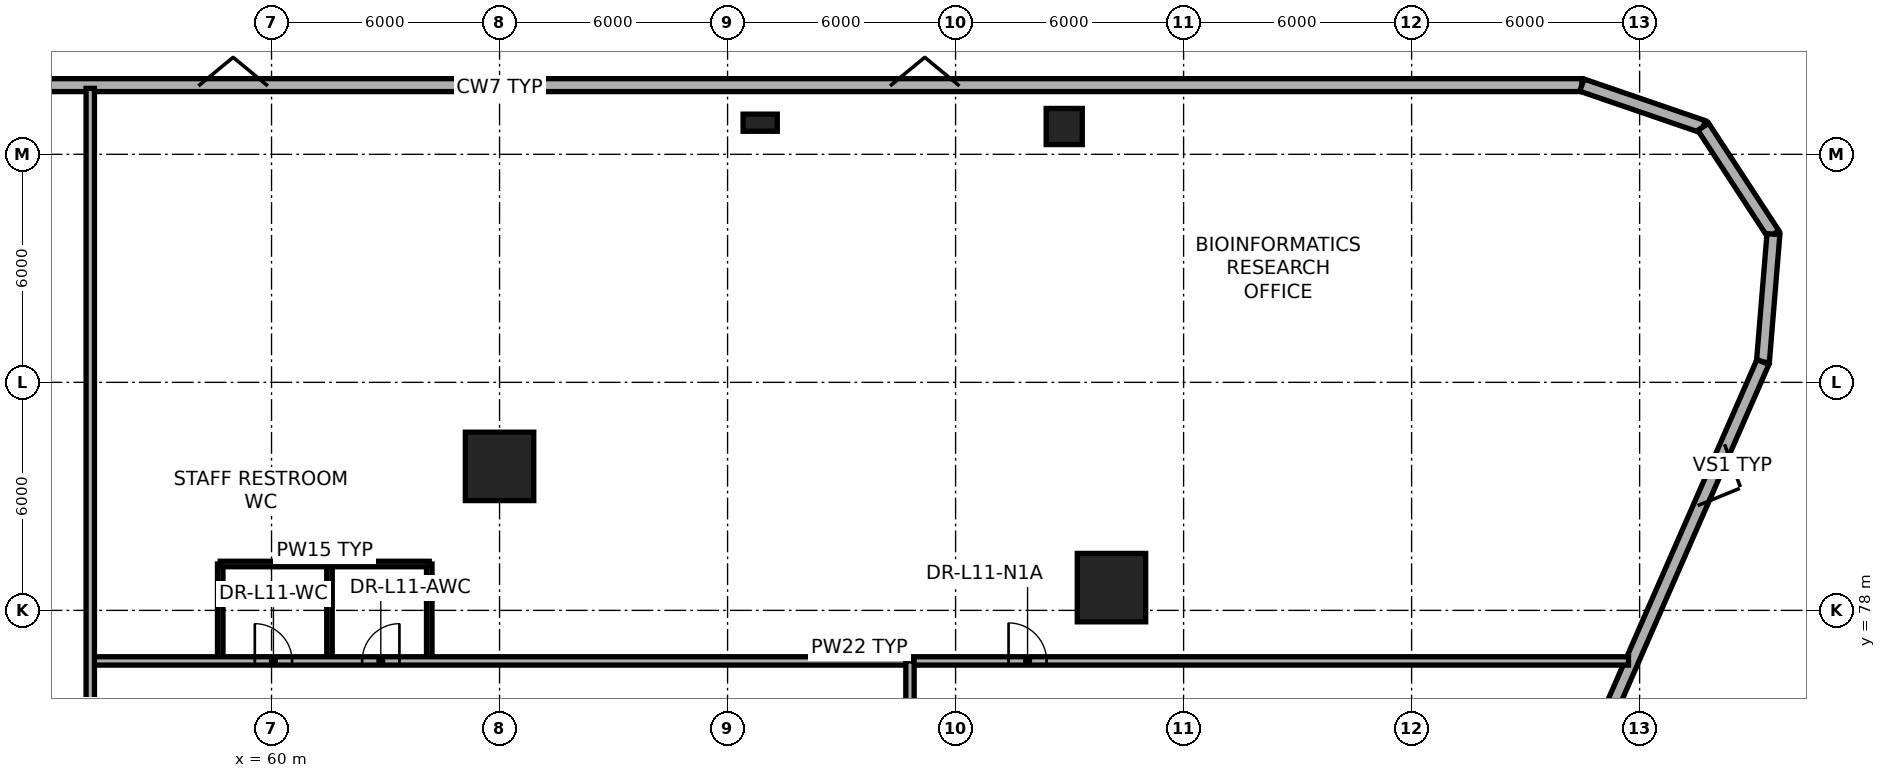
"""IFC4 building model, lengths in metres.
Left out: names, types, materials, properties, quantities, classifications, styles, units other than length and angle.
Written with IfcOpenShell. Run it as: python <this file> out.ifc"""

import sys

from ifc_helpers import new_model, si_unit, direction, frame, frame_2d, origin, origin_2d, place, context, subcontext, project, spatial, rectangle, extrude, element, fill, save


model = new_model("IFC4")
c1 = context("Model", 3, precision=1e-05, world=origin(), true_north=direction((0.0, 1.0)))
c2 = subcontext(c1, "Body", "Model", "MODEL_VIEW")
j1 = project(units=[si_unit("LENGTHUNIT", "METRE"), si_unit("PLANEANGLEUNIT", "RADIAN")], contexts=[c1])
p1 = place(None, origin())
s1 = spatial("IfcSite", under=j1, at=p1, CompositionType="ELEMENT")
p2 = place(p1, origin())
s2 = spatial("IfcBuilding", under=s1, at=p2, CompositionType="ELEMENT")
p3 = place(p2, frame((0.0, 0.0, 44.7)))
s3 = spatial("IfcBuildingStorey", under=s2, at=p3, CompositionType="ELEMENT", Elevation=44.7)
for number, where, z_axis, x_axis in (
    (1, (82.102, 78.599, 0.0), (0.0, 0.0, 1.0), (1.0, 0.0, 0.0)),
    (2, (66.0, 81.789, 0.0), (0.0, 0.0, 1.0), (1.0, 0.0, 0.0)),
):
    element("IfcColumn", number, at=place(p3, frame(where, z_axis=z_axis, x_axis=x_axis)), inside=s3, PredefinedType="COLUMN", context=c2, shape_type="SweptSolid", body=[
        extrude(rectangle(XDim=1.8, YDim=1.8, at=origin_2d()), origin(), (0.0, 0.0, 1.0), 3.65),
    ])
p4 = place(p3, frame((80.908, 90.793, 0.003), z_axis=(-0.026841076243, -0.033534611465, 0.999077067328), x_axis=(-0.780716755404, 0.624885067698, 0.0)))
e3 = element("IfcColumn", 3, at=p4, inside=s3, PredefinedType="COLUMN", context=c2, shape_type="SweptSolid", body=[
    extrude(rectangle(XDim=0.95, YDim=0.95, at=origin_2d()), origin(), (0.0, 0.0, 1.0), 3.647),
])
p5 = place(p3, frame((72.881, 90.893, 0.003), z_axis=(-0.01238655289, -0.033544124313, 0.999360478022), x_axis=(-0.9380871136, 0.346399433166, 0.0)))
e4 = element("IfcColumn", 4, at=p5, inside=s3, PredefinedType="PILASTER", context=c2, shape_type="SweptSolid", body=[
    extrude(rectangle(XDim=0.9, YDim=0.45, at=origin_2d()), origin(), (0.0, 0.0, 1.0), 3.646),
])
p6 = place(p3, frame((37.519, 91.821, 0.0), z_axis=(0.0, 0.0, 1.0), x_axis=(1.0, 0.0, 0.0)))
e5 = element("IfcWall", 5, at=p6, inside=s3, PredefinedType="STANDARD", context=c2, shape_type="SweptSolid", body=[
    extrude(rectangle(XDim=56.961, YDim=0.34, at=frame_2d((28.481, 0.0))), origin(), (0.0, 0.0, 1.0), 0.85),
])
p7 = place(p3, frame((94.481, 91.821, 0.0), z_axis=(0.0, 0.0, 1.0), x_axis=(0.945840034207, -0.324633069314, 0.0)))
e6 = element("IfcWall", 6, at=p7, inside=s3, PredefinedType="STANDARD", context=c2, shape_type="SweptSolid", body=[
    extrude(rectangle(XDim=3.376, YDim=0.34, at=frame_2d((1.688, 0.0))), origin(), (0.0, 0.0, 1.0), 3.375),
])
p8 = place(p3, frame((97.674, 90.725, 0.0), z_axis=(0.0, 0.0, 1.0), x_axis=(0.547200646652, -0.837001464935, 0.0)))
e7 = element("IfcWall", 7, at=p8, inside=s3, PredefinedType="STANDARD", context=c2, shape_type="SweptSolid", body=[
    extrude(rectangle(XDim=3.376, YDim=0.34, at=frame_2d((1.688, 0.0))), origin(), (0.0, 0.0, 1.0), 3.375),
])
p9 = place(p3, frame((99.521, 87.899, 0.0), z_axis=(0.0, 0.0, 1.0), x_axis=(-0.082010022953, -0.996631504687, 0.0)))
e8 = element("IfcWall", 8, at=p9, inside=s3, PredefinedType="STANDARD", context=c2, shape_type="SweptSolid", body=[
    extrude(rectangle(XDim=3.376, YDim=0.34, at=frame_2d((1.688, 0.0))), origin(), (0.0, 0.0, 1.0), 3.375),
])
p10 = place(p3, frame((99.244, 84.535, 0.0), z_axis=(0.0, 0.0, 1.0), x_axis=(-0.401102097931, -0.916033354761, 0.0)))
e9 = element("IfcWall", 9, at=p10, inside=s3, PredefinedType="STANDARD", context=c2, shape_type="SweptSolid", body=[
    extrude(rectangle(XDim=29.703, YDim=0.34, at=frame_2d((14.852, 0.0))), origin(), (0.0, 0.0, 1.0), 0.85),
])
p11 = place(p3, frame((61.237, 19.49, 0.0), z_axis=(0.0, 0.0, 1.0), x_axis=(-0.401097303432, 0.916035454106, 0.0)))
e10 = element("IfcWall", 10, at=p11, inside=s3, PredefinedType="STANDARD", context=c2, shape_type="SweptSolid", body=[
    extrude(rectangle(XDim=71.007, YDim=0.34, at=frame_2d((35.503, 0.0))), origin(), (0.0, 0.0, 1.0), 0.85),
])
for number, where, z_axis, x_axis in (
    (11, (58.65, 76.67, 0.0), (0.0, 0.0, 1.0), (0.0, 1.0, 0.0)),
    (12, (61.525, 76.67, 0.0), (0.0, 0.0, 1.0), (0.0, 1.0, 0.0)),
    (13, (64.15, 76.67, 0.0), (0.0, 0.0, 1.0), (0.0, 1.0, 0.0)),
):
    element("IfcWall", number, at=place(p3, frame(where, z_axis=z_axis, x_axis=x_axis)), inside=s3, PredefinedType="PARTITIONING", context=c2, shape_type="SweptSolid", body=[
        extrude(rectangle(XDim=2.55, YDim=0.145, at=frame_2d((1.275, 0.0))), origin(), (0.0, 0.0, 1.0), 3.375),
    ])
p12 = place(p3, frame((58.65, 79.22, 0.0), z_axis=(0.0, 0.0, 1.0), x_axis=(1.0, 0.0, 0.0)))
e14 = element("IfcWall", 14, at=p12, inside=s3, PredefinedType="PARTITIONING", context=c2, shape_type="SweptSolid", body=[
    extrude(rectangle(XDim=5.5, YDim=0.145, at=frame_2d((2.75, 0.0))), origin(), (0.0, 0.0, 1.0), 3.375),
])
p13 = place(p3, frame((55.23, 76.67, 0.0), z_axis=(0.0, 0.0, 1.0), x_axis=(1.0, 0.0, 0.0)))
e15 = element("IfcWall", 15, at=p13, inside=s3, PredefinedType="PARTITIONING", context=c2, shape_type="SweptSolid", body=[
    extrude(rectangle(XDim=40.478, YDim=0.22, at=frame_2d((20.239, 0.0))), origin(), (0.0, 0.0, 1.0), 2.505),
])
p14 = place(p13, frame((4.33, 0.0, 0.0)))
e16 = element("IfcOpeningElement", 16, at=p14, cuts=e15, PredefinedType="OPENING", context=c2, shape_type="SweptSolid", body=[
    extrude(rectangle(XDim=0.98, YDim=2.1, at=frame_2d((0.49, 1.05))), frame((0.0, 0.12, 0.0), z_axis=(0.0, -1.0, 0.0), x_axis=(1.0, 0.0, 0.0)), (0.0, 0.0, 1.0), 0.24),
])
p15 = place(p13, frame((7.155, 0.0, 0.0)))
e17 = element("IfcOpeningElement", 17, at=p15, cuts=e15, PredefinedType="OPENING", context=c2, shape_type="SweptSolid", body=[
    extrude(rectangle(XDim=0.98, YDim=2.1, at=frame_2d((0.49, 1.05))), frame((0.0, 0.12, 0.0), z_axis=(0.0, -1.0, 0.0), x_axis=(1.0, 0.0, 0.0)), (0.0, 0.0, 1.0), 0.24),
])
p16 = place(p13, frame((24.164, 0.0, 0.0)))
e18 = element("IfcOpeningElement", 18, at=p16, cuts=e15, PredefinedType="OPENING", context=c2, shape_type="SweptSolid", body=[
    extrude(rectangle(XDim=1.0, YDim=2.1, at=frame_2d((0.5, 1.05))), frame((0.0, 0.12, 0.0), z_axis=(0.0, -1.0, 0.0), x_axis=(1.0, 0.0, 0.0)), (0.0, 0.0, 1.0), 0.24),
])
p17 = place(p3, frame((55.23, 59.33, 0.0), z_axis=(0.0, 0.0, 1.0), x_axis=(0.0, 1.0, 0.0)))
e19 = element("IfcWall", 19, at=p17, inside=s3, PredefinedType="PARTITIONING", context=c2, shape_type="SweptSolid", body=[
    extrude(rectangle(XDim=32.406, YDim=0.22, at=frame_2d((16.203, 0.0))), origin(), (0.0, 0.0, 1.0), 2.505),
])
p18 = place(p17, frame((2.39, 0.0, 0.0)))
e20 = element("IfcOpeningElement", 20, at=p18, cuts=e19, PredefinedType="OPENING", context=c2, shape_type="SweptSolid", body=[
    extrude(rectangle(XDim=1.0, YDim=2.1, at=frame_2d((0.5, 1.05))), frame((0.0, 0.12, 0.0), z_axis=(0.0, -1.0, 0.0), x_axis=(1.0, 0.0, 0.0)), (0.0, 0.0, 1.0), 0.24),
])
p19 = place(p17, frame((8.17, 0.0, 0.0)))
e21 = element("IfcOpeningElement", 21, at=p19, cuts=e19, PredefinedType="OPENING", context=c2, shape_type="SweptSolid", body=[
    extrude(rectangle(XDim=1.0, YDim=2.1, at=frame_2d((0.5, 1.05))), frame((0.0, 0.12, 0.0), z_axis=(0.0, -1.0, 0.0), x_axis=(1.0, 0.0, 0.0)), (0.0, 0.0, 1.0), 0.24),
])
p20 = place(p17, frame((13.95, 0.0, 0.0)))
e22 = element("IfcOpeningElement", 22, at=p20, cuts=e19, PredefinedType="OPENING", context=c2, shape_type="SweptSolid", body=[
    extrude(rectangle(XDim=1.0, YDim=2.1, at=frame_2d((0.5, 1.05))), frame((0.0, 0.12, 0.0), z_axis=(0.0, -1.0, 0.0), x_axis=(1.0, 0.0, 0.0)), (0.0, 0.0, 1.0), 0.24),
])
p21 = place(p3, frame((76.8, 33.489, 0.0), z_axis=(0.0, 0.0, 1.0), x_axis=(0.0, 1.0, 0.0)))
e23 = element("IfcWall", 23, at=p21, inside=s3, PredefinedType="PARTITIONING", context=c2, shape_type="SweptSolid", body=[
    extrude(rectangle(XDim=43.181, YDim=0.22, at=frame_2d((21.591, 0.0))), origin(), (0.0, 0.0, 1.0), 2.505),
])
p22 = place(p21, frame((29.651, 0.0, 0.0)))
e24 = element("IfcOpeningElement", 24, at=p22, cuts=e23, PredefinedType="OPENING", context=c2, shape_type="SweptSolid", body=[
    extrude(rectangle(XDim=1.05, YDim=2.15, at=frame_2d((0.525, 1.075))), frame((0.0, 0.12, 0.0), z_axis=(0.0, -1.0, 0.0), x_axis=(1.0, 0.0, 0.0)), (0.0, 0.0, 1.0), 0.24),
])
p23 = place(p21, frame((38.321, 0.0, 0.0)))
e25 = element("IfcOpeningElement", 25, at=p23, cuts=e23, PredefinedType="OPENING", context=c2, shape_type="SweptSolid", body=[
    extrude(rectangle(XDim=1.05, YDim=2.15, at=frame_2d((0.525, 1.075))), frame((0.0, 0.12, 0.0), z_axis=(0.0, -1.0, 0.0), x_axis=(1.0, 0.0, 0.0)), (0.0, 0.0, 1.0), 0.24),
])
p24 = place(p14, origin())
e26 = element("IfcDoor", 26, at=p24, inside=s3, OperationType="SINGLE_SWING_LEFT", PredefinedType="DOOR", context=c2, shape_type="SweptSolid", body=[
    extrude(rectangle(XDim=0.98, YDim=2.1, at=frame_2d((0.49, 1.05))), frame((0.0, 0.025, 0.0), z_axis=(0.0, -1.0, 0.0), x_axis=(1.0, 0.0, 0.0)), (0.0, 0.0, 1.0), 0.05),
])
fill(e16, e26)
p25 = place(p15, origin())
e27 = element("IfcDoor", 27, at=p25, inside=s3, OperationType="SINGLE_SWING_RIGHT", PredefinedType="DOOR", context=c2, shape_type="SweptSolid", body=[
    extrude(rectangle(XDim=0.98, YDim=2.1, at=frame_2d((0.49, 1.05))), frame((0.0, 0.025, 0.0), z_axis=(0.0, -1.0, 0.0), x_axis=(1.0, 0.0, 0.0)), (0.0, 0.0, 1.0), 0.05),
])
fill(e17, e27)
p26 = place(p16, origin())
e28 = element("IfcDoor", 28, at=p26, inside=s3, OperationType="SINGLE_SWING_LEFT", PredefinedType="DOOR", context=c2, shape_type="SweptSolid", body=[
    extrude(rectangle(XDim=1.0, YDim=2.1, at=frame_2d((0.5, 1.05))), frame((0.0, 0.025, 0.0), z_axis=(0.0, -1.0, 0.0), x_axis=(1.0, 0.0, 0.0)), (0.0, 0.0, 1.0), 0.05),
])
fill(e18, e28)
save(model, sys.argv[1])
